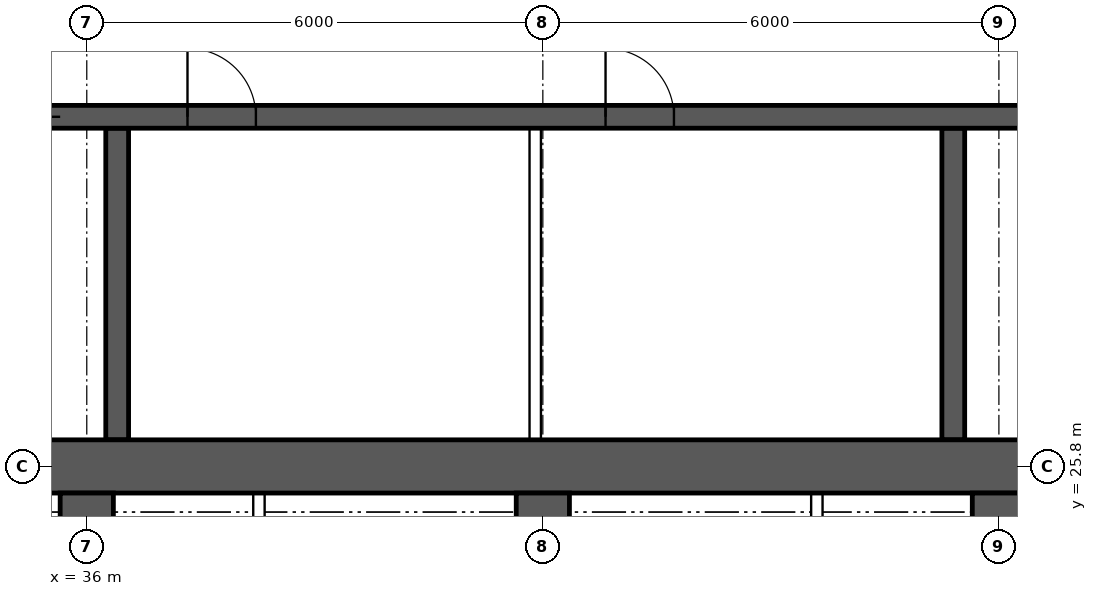
"""IFC4 building model, lengths in metres.
Left out: names, types, materials, properties, quantities, classifications, styles, units other than length and angle.
Written with IfcOpenShell. Run it as: python <this file> out.ifc"""

import sys

from ifc_helpers import new_model, si_unit, direction, frame, frame_2d, origin, place, context, subcontext, project, spatial, rectangle, extrude, element, fill, save


model = new_model("IFC4")
c1 = context("Model", 3, precision=1e-05, world=origin(), true_north=direction((0.0, 1.0)))
c2 = subcontext(c1, "Body", "Model", "MODEL_VIEW")
j1 = project(units=[si_unit("LENGTHUNIT", "METRE"), si_unit("PLANEANGLEUNIT", "RADIAN")], contexts=[c1])
p1 = place(None, origin())
s1 = spatial("IfcSite", under=j1, at=p1, CompositionType="ELEMENT")
p2 = place(p1, origin())
s2 = spatial("IfcBuilding", under=s1, at=p2, CompositionType="ELEMENT")
p3 = place(p2, frame((0.0, 0.0, 254.05)))
s3 = spatial("IfcBuildingStorey", under=s2, at=p3, CompositionType="ELEMENT", Elevation=254.05)
p4 = place(p3, frame((18.0, 25.8, 0.0), z_axis=(0.0, 0.0, 1.0), x_axis=(1.0, 0.0, 0.0)))
e1 = element("IfcWall", 1, at=p4, inside=s3, PredefinedType="SHEAR", context=c2, shape_type="SweptSolid", body=[
    extrude(rectangle(XDim=48.0, YDim=0.7, at=frame_2d((24.0, 0.0))), origin(), (0.0, 0.0, 1.0), 3.75),
])
p5 = place(p3, frame((18.35, 30.4, 0.0), z_axis=(0.0, 0.0, 1.0), x_axis=(1.0, 0.0, 0.0)))
e2 = element("IfcWall", 2, at=p5, inside=s3, PredefinedType="SHEAR", context=c2, shape_type="SweptSolid", body=[
    extrude(rectangle(XDim=47.3, YDim=0.3, at=frame_2d((23.65, 0.0))), origin(), (0.0, 0.0, 1.0), 3.75),
])
p6 = place(p5, frame((0.4, 0.0, 0.0)))
e3 = element("IfcOpeningElement", 3, at=p6, cuts=e2, PredefinedType="OPENING", context=c2, shape_type="SweptSolid", body=[
    extrude(rectangle(XDim=1.0, YDim=2.1, at=frame_2d((0.5, 1.05))), frame((0.0, 0.16, 0.0), z_axis=(0.0, -1.0, 0.0), x_axis=(1.0, 0.0, 0.0)), (0.0, 0.0, 1.0), 0.32),
])
p7 = place(p5, frame((45.9, 0.0, 0.0)))
e4 = element("IfcOpeningElement", 4, at=p7, cuts=e2, PredefinedType="OPENING", context=c2, shape_type="SweptSolid", body=[
    extrude(rectangle(XDim=1.0, YDim=2.1, at=frame_2d((0.5, 1.05))), frame((0.0, 0.16, 0.0), z_axis=(0.0, -1.0, 0.0), x_axis=(1.0, 0.0, 0.0)), (0.0, 0.0, 1.0), 0.32),
])
p8 = place(p5, frame((8.4, 0.0, 0.0)))
e5 = element("IfcOpeningElement", 5, at=p8, cuts=e2, PredefinedType="OPENING", context=c2, shape_type="SweptSolid", body=[
    extrude(rectangle(XDim=1.1, YDim=2.1, at=frame_2d((0.55, 1.05))), frame((0.0, 0.16, 0.0), z_axis=(0.0, -1.0, 0.0), x_axis=(1.0, 0.0, 0.0)), (0.0, 0.0, 1.0), 0.32),
])
p9 = place(p5, frame((11.0, 0.0, 0.0)))
e6 = element("IfcOpeningElement", 6, at=p9, cuts=e2, PredefinedType="OPENING", context=c2, shape_type="SweptSolid", body=[
    extrude(rectangle(XDim=1.1, YDim=2.1, at=frame_2d((0.55, 1.05))), frame((0.0, 0.16, 0.0), z_axis=(0.0, -1.0, 0.0), x_axis=(1.0, 0.0, 0.0)), (0.0, 0.0, 1.0), 0.32),
])
p10 = place(p5, frame((13.6, 0.0, 0.0)))
e7 = element("IfcOpeningElement", 7, at=p10, cuts=e2, PredefinedType="OPENING", context=c2, shape_type="SweptSolid", body=[
    extrude(rectangle(XDim=1.1, YDim=2.1, at=frame_2d((0.55, 1.05))), frame((0.0, 0.16, 0.0), z_axis=(0.0, -1.0, 0.0), x_axis=(1.0, 0.0, 0.0)), (0.0, 0.0, 1.0), 0.32),
])
p11 = place(p5, frame((16.2, 0.0, 0.0)))
e8 = element("IfcOpeningElement", 8, at=p11, cuts=e2, PredefinedType="OPENING", context=c2, shape_type="SweptSolid", body=[
    extrude(rectangle(XDim=1.1, YDim=2.1, at=frame_2d((0.55, 1.05))), frame((0.0, 0.16, 0.0), z_axis=(0.0, -1.0, 0.0), x_axis=(1.0, 0.0, 0.0)), (0.0, 0.0, 1.0), 0.32),
])
p12 = place(p5, frame((18.975, 0.0, 0.0)))
e9 = element("IfcOpeningElement", 9, at=p12, cuts=e2, PredefinedType="OPENING", context=c2, shape_type="SweptSolid", body=[
    extrude(rectangle(XDim=0.9, YDim=2.1, at=frame_2d((0.45, 1.05))), frame((0.0, 0.16, 0.0), z_axis=(0.0, -1.0, 0.0), x_axis=(1.0, 0.0, 0.0)), (0.0, 0.0, 1.0), 0.32),
])
p13 = place(p5, frame((24.475, 0.0, 0.0)))
e10 = element("IfcOpeningElement", 10, at=p13, cuts=e2, PredefinedType="OPENING", context=c2, shape_type="SweptSolid", body=[
    extrude(rectangle(XDim=0.9, YDim=2.1, at=frame_2d((0.45, 1.05))), frame((0.0, 0.16, 0.0), z_axis=(0.0, -1.0, 0.0), x_axis=(1.0, 0.0, 0.0)), (0.0, 0.0, 1.0), 0.32),
])
p14 = place(p5, frame((30.267, 0.0, 0.0)))
e11 = element("IfcOpeningElement", 11, at=p14, cuts=e2, PredefinedType="OPENING", context=c2, shape_type="SweptSolid", body=[
    extrude(rectangle(XDim=1.1, YDim=2.1, at=frame_2d((0.55, 1.05))), frame((0.0, 0.16, 0.0), z_axis=(0.0, -1.0, 0.0), x_axis=(1.0, 0.0, 0.0)), (0.0, 0.0, 1.0), 0.32),
])
p15 = place(p5, frame((33.8, 0.0, 0.0)))
e12 = element("IfcOpeningElement", 12, at=p15, cuts=e2, PredefinedType="OPENING", context=c2, shape_type="SweptSolid", body=[
    extrude(rectangle(XDim=1.1, YDim=2.1, at=frame_2d((0.55, 1.05))), frame((0.0, 0.16, 0.0), z_axis=(0.0, -1.0, 0.0), x_axis=(1.0, 0.0, 0.0)), (0.0, 0.0, 1.0), 0.32),
])
p16 = place(p5, frame((37.333, 0.0, 0.0)))
e13 = element("IfcOpeningElement", 13, at=p16, cuts=e2, PredefinedType="OPENING", context=c2, shape_type="SweptSolid", body=[
    extrude(rectangle(XDim=1.1, YDim=2.1, at=frame_2d((0.55, 1.05))), frame((0.0, 0.16, 0.0), z_axis=(0.0, -1.0, 0.0), x_axis=(1.0, 0.0, 0.0)), (0.0, 0.0, 1.0), 0.32),
])
for number, where, z_axis, x_axis in (
    (14, (36.4, 26.15, 0.0), (0.0, 0.0, 1.0), (0.0, 1.0, 0.0)),
    (15, (47.4, 26.15, 0.0), (0.0, 0.0, 1.0), (0.0, 1.0, 0.0)),
):
    element("IfcWall", number, at=place(p3, frame(where, z_axis=z_axis, x_axis=x_axis)), inside=s3, PredefinedType="SHEAR", context=c2, shape_type="SweptSolid", body=[
        extrude(rectangle(XDim=4.1, YDim=0.3, at=frame_2d((2.05, 0.0))), origin(), (0.0, 0.0, 1.0), 3.75),
    ])
for number, where, z_axis, x_axis in (
    (16, (36.0, 18.4, 0.0), (0.0, 0.0, 1.0), (0.0, 1.0, 0.0)),
    (17, (42.0, 18.4, 0.0), (0.0, 0.0, 1.0), (0.0, 1.0, 0.0)),
    (18, (48.0, 18.4, 0.0), (0.0, 0.0, 1.0), (0.0, 1.0, 0.0)),
):
    element("IfcWall", number, at=place(p3, frame(where, z_axis=z_axis, x_axis=x_axis)), inside=s3, PredefinedType="SHEAR", context=c2, shape_type="SweptSolid", body=[
        extrude(rectangle(XDim=7.05, YDim=0.7, at=frame_2d((3.525, 0.0))), origin(), (0.0, 0.0, 1.0), 3.75),
    ])
p17 = place(p3, frame((41.9, 26.15, 0.0), z_axis=(0.0, 0.0, 1.0), x_axis=(0.0, 1.0, 0.0)))
e19 = element("IfcWall", 19, at=p17, inside=s3, PredefinedType="SOLIDWALL", context=c2, shape_type="SweptSolid", body=[
    extrude(rectangle(XDim=4.1, YDim=0.15, at=frame_2d((2.05, 0.0))), origin(), (0.0, 0.0, 1.0), 3.45),
])
for number, where, z_axis, x_axis in (
    (20, (38.265, 18.5, 0.0), (0.0, 0.0, 1.0), (0.0, 1.0, 0.0)),
    (21, (45.605, 18.5, 0.0), (0.0, 0.0, 1.0), (0.0, 1.0, 0.0)),
):
    element("IfcWall", number, at=place(p3, frame(where, z_axis=z_axis, x_axis=x_axis)), inside=s3, PredefinedType="PARTITIONING", context=c2, shape_type="SweptSolid", body=[
        extrude(rectangle(XDim=6.95, YDim=0.15, at=frame_2d((3.475, 0.0))), origin(), (0.0, 0.0, 1.0), 3.45),
    ])
p18 = place(p11, origin())
e22 = element("IfcDoor", 22, at=p18, inside=s3, OperationType="DOUBLE_DOOR_SLIDING", PredefinedType="DOOR", context=c2, shape_type="SweptSolid", body=[
    extrude(rectangle(XDim=1.1, YDim=2.1, at=frame_2d((0.55, 1.05))), frame((0.0, 0.025, 0.0), z_axis=(0.0, -1.0, 0.0), x_axis=(1.0, 0.0, 0.0)), (0.0, 0.0, 1.0), 0.05),
])
fill(e8, e22)
p19 = place(p12, origin())
e23 = element("IfcDoor", 23, at=p19, inside=s3, OperationType="SINGLE_SWING_LEFT", PredefinedType="DOOR", context=c2, shape_type="SweptSolid", body=[
    extrude(rectangle(XDim=0.9, YDim=2.1, at=frame_2d((0.45, 1.05))), frame((0.0, 0.025, 0.0), z_axis=(0.0, -1.0, 0.0), x_axis=(1.0, 0.0, 0.0)), (0.0, 0.0, 1.0), 0.05),
])
fill(e9, e23)
p20 = place(p13, origin())
e24 = element("IfcDoor", 24, at=p20, inside=s3, OperationType="SINGLE_SWING_LEFT", PredefinedType="DOOR", context=c2, shape_type="SweptSolid", body=[
    extrude(rectangle(XDim=0.9, YDim=2.1, at=frame_2d((0.45, 1.05))), frame((0.0, 0.025, 0.0), z_axis=(0.0, -1.0, 0.0), x_axis=(1.0, 0.0, 0.0)), (0.0, 0.0, 1.0), 0.05),
])
fill(e10, e24)
save(model, sys.argv[1])
